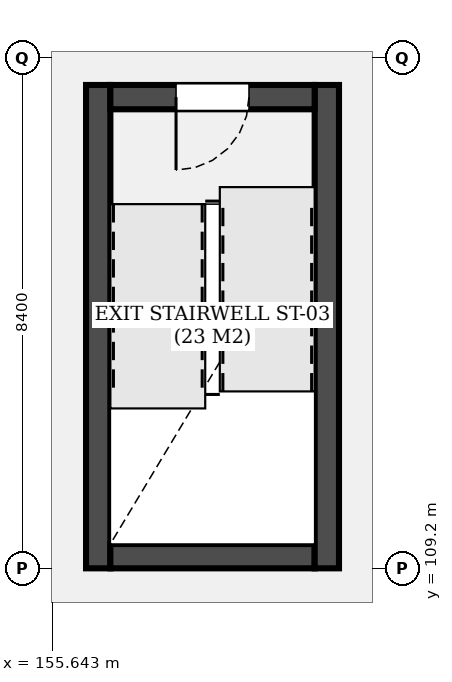
"""IFC4 building model, lengths in metres.
Left out: names, types, materials, properties, quantities, classifications, styles, units other than length and angle.
Written with IfcOpenShell. Run it as: python <this file> out.ifc"""

import sys

from ifc_helpers import new_model, si_unit, direction, frame, frame_2d, origin, place, context, subcontext, project, spatial, rectangle, extrude, element, fill, save


model = new_model("IFC4")
c1 = context("Model", 3, precision=1e-05, world=origin(), true_north=direction((0.0, 1.0)))
c2 = subcontext(c1, "Body", "Model", "MODEL_VIEW")
j1 = project(units=[si_unit("LENGTHUNIT", "METRE"), si_unit("PLANEANGLEUNIT", "RADIAN")], contexts=[c1])
p1 = place(None, origin())
s1 = spatial("IfcSite", under=j1, at=p1, CompositionType="ELEMENT")
p2 = place(p1, origin())
s2 = spatial("IfcBuilding", under=s1, at=p2, CompositionType="ELEMENT")
p3 = place(p2, frame((0.0, 0.0, 13.5)))
s3 = spatial("IfcBuildingStorey", under=s2, at=p3, CompositionType="ELEMENT", Elevation=13.5)
p4 = place(p3, frame((156.4, 117.15, 0.0), z_axis=(0.0, 0.0, 1.0), x_axis=(0.0, -1.0, 0.0)))
e1 = element("IfcWall", 1, at=p4, inside=s3, PredefinedType="SHEAR", context=c2, shape_type="SweptSolid", body=[
    extrude(rectangle(XDim=7.95, YDim=0.4, at=frame_2d((3.975, 0.0))), origin(), (0.0, 0.0, 1.0), 4.3),
])
p5 = place(p3, frame((156.6, 109.4, 0.0), z_axis=(0.0, 0.0, 1.0), x_axis=(1.0, 0.0, 0.0)))
e2 = element("IfcWall", 2, at=p5, inside=s3, PredefinedType="SHEAR", context=c2, shape_type="SweptSolid", body=[
    extrude(rectangle(XDim=3.36, YDim=0.4, at=frame_2d((1.68, 0.0))), origin(), (0.0, 0.0, 1.0), 4.3),
])
p6 = place(p3, frame((160.16, 109.2, 0.0), z_axis=(0.0, 0.0, 1.0), x_axis=(0.0, 1.0, 0.0)))
e3 = element("IfcWall", 3, at=p6, inside=s3, PredefinedType="SHEAR", context=c2, shape_type="SweptSolid", body=[
    extrude(rectangle(XDim=7.95, YDim=0.4, at=frame_2d((3.975, 0.0))), origin(), (0.0, 0.0, 1.0), 4.3),
])
p7 = place(p3, frame((159.96, 116.95, 0.0), z_axis=(0.0, 0.0, 1.0), x_axis=(-1.0, 0.0, 0.0)))
e4 = element("IfcWall", 4, at=p7, inside=s3, PredefinedType="SHEAR", context=c2, shape_type="SweptSolid", body=[
    extrude(rectangle(XDim=3.36, YDim=0.4, at=frame_2d((1.68, 0.0))), origin(), (0.0, 0.0, 1.0), 4.3),
])
p8 = place(p7, frame((1.08, 0.0, 0.0)))
e5 = element("IfcOpeningElement", 5, at=p8, cuts=e4, PredefinedType="OPENING", context=c2, shape_type="SweptSolid", body=[
    extrude(rectangle(XDim=1.2, YDim=2.2, at=frame_2d((0.6, 1.1))), frame((0.0, 0.21, 0.0), z_axis=(0.0, -1.0, 0.0), x_axis=(1.0, 0.0, 0.0)), (0.0, 0.0, 1.0), 0.42),
])
p9 = place(p8, origin())
e6 = element("IfcDoor", 6, at=p9, inside=s3, OperationType="SINGLE_SWING_RIGHT", PredefinedType="DOOR", context=c2, shape_type="SweptSolid", body=[
    extrude(rectangle(XDim=1.2, YDim=2.2, at=frame_2d((0.6, 1.1))), frame((0.0, 0.025, 0.0), z_axis=(0.0, -1.0, 0.0), x_axis=(1.0, 0.0, 0.0)), (0.0, 0.0, 1.0), 0.05),
])
fill(e5, e6)
save(model, sys.argv[1])
